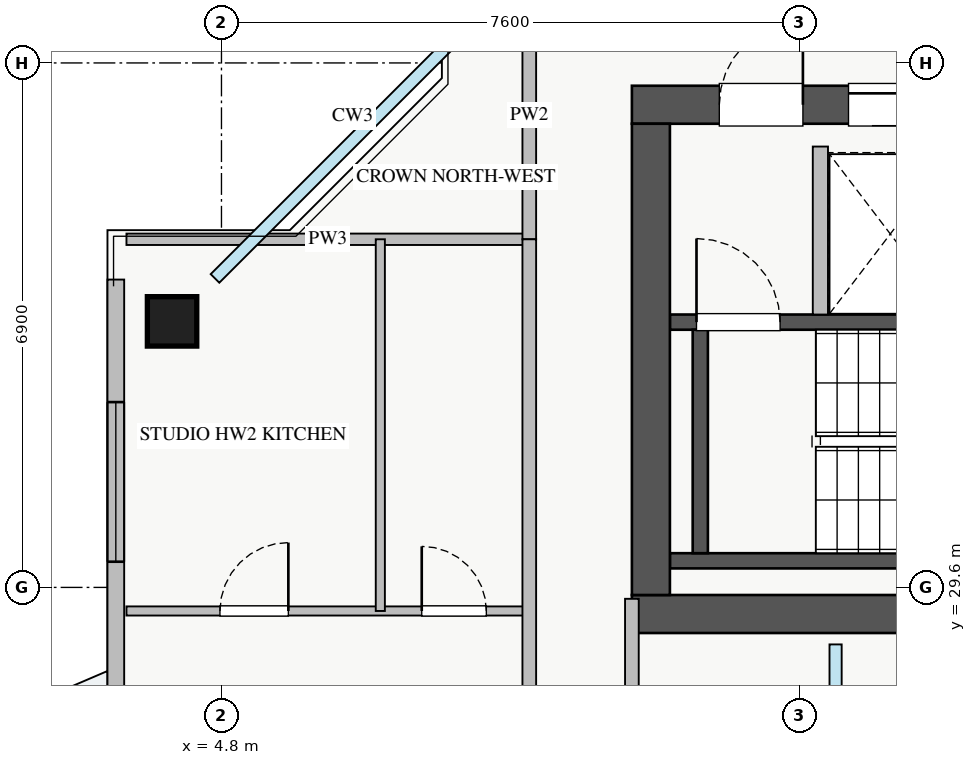
"""IFC4 building model, lengths in metres.
Left out: names, types, materials, properties, quantities, classifications, styles, units other than length and angle.
Written with IfcOpenShell. Run it as: python <this file> out.ifc"""

import sys

from ifc_helpers import new_model, si_unit, direction, frame, frame_2d, origin, origin_2d, place, context, subcontext, project, spatial, rectangle, extrude, source, transform, mapped, element, fill, save


model = new_model("IFC4")
c1 = context("Model", 3, precision=1e-05, world=origin(), true_north=direction((0.0, 1.0)))
c2 = subcontext(c1, "Body", "Model", "MODEL_VIEW")
j1 = project(units=[si_unit("LENGTHUNIT", "METRE"), si_unit("PLANEANGLEUNIT", "RADIAN")], contexts=[c1])
p1 = place(None, origin())
s1 = spatial("IfcSite", under=j1, at=p1, CompositionType="ELEMENT")
p2 = place(p1, origin())
s2 = spatial("IfcBuilding", under=s1, at=p2, CompositionType="ELEMENT")
p3 = place(p2, frame((0.0, 0.0, 250.25)))
s3 = spatial("IfcBuildingStorey", under=s2, at=p3, CompositionType="ELEMENT", Elevation=250.25)
p4 = place(p3, frame((12.68, 33.2, 0.0), z_axis=(0.0, 0.0, 1.0), x_axis=(1.0, 0.0, 0.0)))
e1 = element("IfcWall", 1, at=p4, inside=s3, PredefinedType="SHEAR", context=c2, shape_type="SweptSolid", body=[
    extrude(rectangle(XDim=1.94, YDim=0.18, at=frame_2d((0.97, 0.0))), origin(), (0.0, 0.0, 1.0), 3.07),
])
p5 = place(p3, frame((10.7, 29.95, 0.0), z_axis=(0.0, 0.0, 1.0), x_axis=(1.0, 0.0, 0.0)))
e2 = element("IfcWall", 2, at=p5, inside=s3, PredefinedType="SHEAR", context=c2, shape_type="SweptSolid", body=[
    extrude(rectangle(XDim=7.45, YDim=0.2, at=frame_2d((3.725, 0.0))), origin(), (0.0, 0.0, 1.0), 3.25),
])
p6 = place(p3, frame((10.7, 33.09, 0.0), z_axis=(0.0, 0.0, 1.0), x_axis=(1.0, 0.0, 0.0)))
e3 = element("IfcWall", 3, at=p6, inside=s3, PredefinedType="SHEAR", context=c2, shape_type="SweptSolid", body=[
    extrude(rectangle(XDim=7.45, YDim=0.2, at=frame_2d((3.725, 0.0))), origin(), (0.0, 0.0, 1.0), 3.25),
])
p7 = place(p6, frame((0.35, 0.0, 0.0)))
e4 = element("IfcOpeningElement", 4, at=p7, cuts=e3, PredefinedType="OPENING", context=c2, shape_type="SweptSolid", body=[
    extrude(rectangle(XDim=1.1, YDim=2.05, at=frame_2d((0.55, 1.025))), frame((0.0, 0.11, 0.0), z_axis=(0.0, -1.0, 0.0), x_axis=(1.0, 0.0, 0.0)), (0.0, 0.0, 1.0), 0.22),
])
p8 = place(p3, frame((11.1, 30.05, 0.0), z_axis=(0.0, 0.0, 1.0), x_axis=(0.0, 1.0, 0.0)))
e5 = element("IfcWall", 5, at=p8, inside=s3, PredefinedType="SHEAR", context=c2, shape_type="SweptSolid", body=[
    extrude(rectangle(XDim=2.94, YDim=0.2, at=frame_2d((1.47, 0.0))), origin(), (0.0, 0.0, 1.0), 3.25),
])
p9 = place(p3, frame((10.2, 29.25, 0.0), z_axis=(0.0, 0.0, 1.0), x_axis=(1.0, 0.0, 0.0)))
e6 = element("IfcWall", 6, at=p9, inside=s3, PredefinedType="SHEAR", context=c2, shape_type="SweptSolid", body=[
    extrude(rectangle(XDim=17.6, YDim=0.5, at=frame_2d((8.8, 0.0))), origin(), (0.0, 0.0, 1.0), 3.25),
])
p10 = place(p3, frame((10.2, 35.95, 0.0), z_axis=(0.0, 0.0, 1.0), x_axis=(1.0, 0.0, 0.0)))
e7 = element("IfcWall", 7, at=p10, inside=s3, PredefinedType="SHEAR", context=c2, shape_type="SweptSolid", body=[
    extrude(rectangle(XDim=17.6, YDim=0.5, at=frame_2d((8.8, 0.0))), origin(), (0.0, 0.0, 1.0), 3.25),
])
p11 = place(p10, frame((1.15, 0.0, 0.0)))
e8 = element("IfcOpeningElement", 8, at=p11, cuts=e7, PredefinedType="OPENING", context=c2, shape_type="SweptSolid", body=[
    extrude(rectangle(XDim=1.1, YDim=2.05, at=frame_2d((0.55, 1.025))), frame((0.0, 0.26, 0.0), z_axis=(0.0, -1.0, 0.0), x_axis=(1.0, 0.0, 0.0)), (0.0, 0.0, 1.0), 0.52),
])
p12 = place(p10, frame((8.3, 0.0, 0.0)))
e9 = element("IfcOpeningElement", 9, at=p12, cuts=e7, PredefinedType="OPENING", context=c2, shape_type="SweptSolid", body=[
    extrude(rectangle(XDim=1.1, YDim=2.05, at=frame_2d((0.55, 1.025))), frame((0.0, 0.26, 0.0), z_axis=(0.0, -1.0, 0.0), x_axis=(1.0, 0.0, 0.0)), (0.0, 0.0, 1.0), 0.52),
])
p13 = place(p10, frame((2.85, 0.0, 0.0)))
e10 = element("IfcOpeningElement", 10, at=p13, cuts=e7, PredefinedType="OPENING", context=c2, shape_type="SweptSolid", body=[
    extrude(rectangle(XDim=1.1, YDim=2.05, at=frame_2d((0.55, 1.025))), frame((0.0, 0.26, 0.0), z_axis=(0.0, -1.0, 0.0), x_axis=(1.0, 0.0, 0.0)), (0.0, 0.0, 1.0), 0.52),
])
p14 = place(p10, frame((5.8, 0.0, 0.0)))
e11 = element("IfcOpeningElement", 11, at=p14, cuts=e7, PredefinedType="OPENING", context=c2, shape_type="SweptSolid", body=[
    extrude(rectangle(XDim=1.0, YDim=2.05, at=frame_2d((0.5, 1.025))), frame((0.0, 0.26, 0.0), z_axis=(0.0, -1.0, 0.0), x_axis=(1.0, 0.0, 0.0)), (0.0, 0.0, 1.0), 0.52),
])
p15 = place(p10, frame((14.74, 0.0, 0.0)))
e12 = element("IfcOpeningElement", 12, at=p15, cuts=e7, PredefinedType="OPENING", context=c2, shape_type="SweptSolid", body=[
    extrude(rectangle(XDim=1.0, YDim=2.05, at=frame_2d((0.5, 1.025))), frame((0.0, 0.26, 0.0), z_axis=(0.0, -1.0, 0.0), x_axis=(1.0, 0.0, 0.0)), (0.0, 0.0, 1.0), 0.52),
])
p16 = place(p10, frame((10.25, 0.0, 0.0)))
e13 = element("IfcOpeningElement", 13, at=p16, cuts=e7, PredefinedType="OPENING", context=c2, shape_type="SweptSolid", body=[
    extrude(rectangle(XDim=1.0, YDim=2.05, at=frame_2d((0.5, 1.025))), frame((0.0, 0.26, 0.0), z_axis=(0.0, -1.0, 0.0), x_axis=(1.0, 0.0, 0.0)), (0.0, 0.0, 1.0), 0.52),
])
p17 = place(p10, frame((12.7, 0.0, 0.0)))
e14 = element("IfcOpeningElement", 14, at=p17, cuts=e7, PredefinedType="OPENING", context=c2, shape_type="SweptSolid", body=[
    extrude(rectangle(XDim=1.0, YDim=2.05, at=frame_2d((0.5, 1.025))), frame((0.0, 0.26, 0.0), z_axis=(0.0, -1.0, 0.0), x_axis=(1.0, 0.0, 0.0)), (0.0, 0.0, 1.0), 0.52),
])
p18 = place(p3, frame((10.45, 29.5, 0.0), z_axis=(0.0, 0.0, 1.0), x_axis=(0.0, 1.0, 0.0)))
e15 = element("IfcWall", 15, at=p18, inside=s3, PredefinedType="SHEAR", context=c2, shape_type="SweptSolid", body=[
    extrude(rectangle(XDim=6.2, YDim=0.5, at=frame_2d((3.1, 0.0))), origin(), (0.0, 0.0, 1.0), 3.25),
])
m1 = source(origin(), c2, "Body", "SweptSolid", [
    extrude(rectangle(XDim=0.65, YDim=0.65, at=origin_2d()), origin(), (0.0, 0.0, 1.0), 3.25),
])
p19 = place(p3, frame((4.15, 33.1, 0.0), z_axis=(0.0, 0.0, 1.0), x_axis=(1.0, 0.0, 0.0)))
e16 = element("IfcColumn", 16, at=p19, inside=s3, PredefinedType="COLUMN", context=c2, shape_type="MappedRepresentation", body=[
    mapped(m1, transform((0.0, 0.0, 0.0), x_axis=(1.0, 0.0, 0.0), y_axis=(0.0, 1.0, 0.0), z_axis=(0.0, 0.0, 1.0), scale=1.0)),
])
p20 = place(p3, frame((3.41, 12.35, 0.0), z_axis=(0.0, 0.0, 1.0), x_axis=(0.0, 1.0, 0.0)))
e17 = element("IfcWall", 17, at=p20, inside=s3, PredefinedType="STANDARD", context=c2, shape_type="SweptSolid", body=[
    extrude(rectangle(XDim=21.3, YDim=0.22, at=frame_2d((10.65, 0.0))), origin(), (0.0, 0.0, 1.0), 2.61),
])
p21 = place(p20, frame((11.5, 0.0, 0.0)))
e18 = element("IfcOpeningElement", 18, at=p21, cuts=e17, PredefinedType="OPENING", context=c2, shape_type="SweptSolid", body=[
    extrude(rectangle(XDim=1.2, YDim=2.1, at=frame_2d((0.6, 1.05))), frame((0.0, 0.12, 0.0), z_axis=(0.0, -1.0, 0.0), x_axis=(1.0, 0.0, 0.0)), (0.0, 0.0, 1.0), 0.24),
])
p22 = place(p20, frame((1.463, 0.0, 0.9)))
e19 = element("IfcOpeningElement", 19, at=p22, cuts=e17, PredefinedType="OPENING", context=c2, shape_type="SweptSolid", body=[
    extrude(rectangle(XDim=2.4, YDim=1.48, at=frame_2d((1.2, 0.74))), frame((0.0, 0.12, 0.0), z_axis=(0.0, -1.0, 0.0), x_axis=(1.0, 0.0, 0.0)), (0.0, 0.0, 1.0), 0.24),
])
p23 = place(p20, frame((17.588, 0.0, 0.9)))
e20 = element("IfcOpeningElement", 20, at=p23, cuts=e17, PredefinedType="OPENING", context=c2, shape_type="SweptSolid", body=[
    extrude(rectangle(XDim=2.1, YDim=1.48, at=frame_2d((1.05, 0.74))), frame((0.0, 0.12, 0.0), z_axis=(0.0, -1.0, 0.0), x_axis=(1.0, 0.0, 0.0)), (0.0, 0.0, 1.0), 0.24),
])
p24 = place(p20, frame((12.92, 0.0, 0.9)))
e21 = element("IfcOpeningElement", 21, at=p24, cuts=e17, PredefinedType="OPENING", context=c2, shape_type="SweptSolid", body=[
    extrude(rectangle(XDim=0.9, YDim=1.2, at=frame_2d((0.45, 0.6))), frame((0.0, 0.12, 0.0), z_axis=(0.0, -1.0, 0.0), x_axis=(1.0, 0.0, 0.0)), (0.0, 0.0, 1.0), 0.24),
])
p25 = place(p3, frame((12.68, 33.19, 0.0), z_axis=(0.0, 0.0, 1.0), x_axis=(0.0, 1.0, 0.0)))
e22 = element("IfcWall", 22, at=p25, inside=s3, PredefinedType="PARTITIONING", context=c2, shape_type="SweptSolid", body=[
    extrude(rectangle(XDim=2.21, YDim=0.2, at=frame_2d((1.105, 0.0))), origin(), (0.0, 0.0, 1.0), 3.07),
])
p26 = place(p3, frame((3.55, 34.18, 0.0), z_axis=(0.0, 0.0, 1.0), x_axis=(1.0, 0.0, 0.0)))
e23 = element("IfcWall", 23, at=p26, inside=s3, PredefinedType="PARTITIONING", context=c2, shape_type="SweptSolid", body=[
    extrude(rectangle(XDim=5.3, YDim=0.15, at=frame_2d((2.65, 0.0))), origin(), (0.0, 0.0, 1.0), 3.07),
])
p27 = place(p3, frame((8.85, 34.18, 0.0), z_axis=(0.0, 0.0, 1.0), x_axis=(0.0, 1.0, 0.0)))
e24 = element("IfcWall", 24, at=p27, inside=s3, PredefinedType="PARTITIONING", context=c2, shape_type="SweptSolid", body=[
    extrude(rectangle(XDim=3.26, YDim=0.18, at=frame_2d((1.63, 0.0))), origin(), (0.0, 0.0, 1.0), 2.569),
])
p28 = place(p3, frame((3.55, 29.29, 0.0), z_axis=(0.0, 0.0, 1.0), x_axis=(1.0, 0.0, 0.0)))
e25 = element("IfcWall", 25, at=p28, inside=s3, PredefinedType="PLUMBINGWALL", context=c2, shape_type="SweptSolid", body=[
    extrude(rectangle(XDim=5.3, YDim=0.12, at=frame_2d((2.65, 0.0))), origin(), (0.0, 0.0, 1.0), 3.07),
])
p29 = place(p28, frame((1.23, 0.0, 0.0)))
e26 = element("IfcOpeningElement", 26, at=p29, cuts=e25, PredefinedType="OPENING", context=c2, shape_type="SweptSolid", body=[
    extrude(rectangle(XDim=0.9, YDim=2.05, at=frame_2d((0.45, 1.025))), frame((0.0, 0.07, 0.0), z_axis=(0.0, -1.0, 0.0), x_axis=(1.0, 0.0, 0.0)), (0.0, 0.0, 1.0), 0.14),
])
p30 = place(p28, frame((3.885, 0.0, 0.0)))
e27 = element("IfcOpeningElement", 27, at=p30, cuts=e25, PredefinedType="OPENING", context=c2, shape_type="SweptSolid", body=[
    extrude(rectangle(XDim=0.85, YDim=2.05, at=frame_2d((0.425, 1.025))), frame((0.0, 0.07, 0.0), z_axis=(0.0, -1.0, 0.0), x_axis=(1.0, 0.0, 0.0)), (0.0, 0.0, 1.0), 0.14),
])
p31 = place(p3, frame((6.89, 29.29, 0.0), z_axis=(0.0, 0.0, 1.0), x_axis=(0.0, 1.0, 0.0)))
e28 = element("IfcWall", 28, at=p31, inside=s3, PredefinedType="PLUMBINGWALL", context=c2, shape_type="SweptSolid", body=[
    extrude(rectangle(XDim=4.89, YDim=0.12, at=frame_2d((2.445, 0.0))), origin(), (0.0, 0.0, 1.0), 3.07),
])
p32 = place(p3, frame((8.85, 11.82, 0.0), z_axis=(0.0, 0.0, 1.0), x_axis=(0.0, 1.0, 0.0)))
e29 = element("IfcWall", 29, at=p32, inside=s3, PredefinedType="PARTITIONING", context=c2, shape_type="SweptSolid", body=[
    extrude(rectangle(XDim=22.36, YDim=0.18, at=frame_2d((11.18, 0.0))), origin(), (0.0, 0.0, 1.0), 2.569),
])
p33 = place(p32, frame((2.475, 0.0, 0.0)))
e30 = element("IfcOpeningElement", 30, at=p33, cuts=e29, PredefinedType="OPENING", context=c2, shape_type="SweptSolid", body=[
    extrude(rectangle(XDim=1.0, YDim=2.05, at=frame_2d((0.5, 1.025))), frame((0.0, 0.1, 0.0), z_axis=(0.0, -1.0, 0.0), x_axis=(1.0, 0.0, 0.0)), (0.0, 0.0, 1.0), 0.2),
])
p34 = place(p32, frame((13.91, 0.0, 0.0)))
e31 = element("IfcOpeningElement", 31, at=p34, cuts=e29, PredefinedType="OPENING", context=c2, shape_type="SweptSolid", body=[
    extrude(rectangle(XDim=1.0, YDim=2.05, at=frame_2d((0.5, 1.025))), frame((0.0, 0.1, 0.0), z_axis=(0.0, -1.0, 0.0), x_axis=(1.0, 0.0, 0.0)), (0.0, 0.0, 1.0), 0.2),
])
p35 = place(p3, frame((10.2, 16.55, 0.0), z_axis=(0.0, 0.0, 1.0), x_axis=(0.0, 1.0, 0.0)))
e32 = element("IfcWall", 32, at=p35, inside=s3, PredefinedType="PARTITIONING", context=c2, shape_type="SweptSolid", body=[
    extrude(rectangle(XDim=12.9, YDim=0.18, at=frame_2d((6.45, 0.0))), origin(), (0.0, 0.0, 1.0), 3.07),
])
p36 = place(p35, frame((3.425, 0.0, 0.0)))
e33 = element("IfcOpeningElement", 33, at=p36, cuts=e32, PredefinedType="OPENING", context=c2, shape_type="SweptSolid", body=[
    extrude(rectangle(XDim=0.85, YDim=2.05, at=frame_2d((0.425, 1.025))), frame((0.0, 0.1, 0.0), z_axis=(0.0, -1.0, 0.0), x_axis=(1.0, 0.0, 0.0)), (0.0, 0.0, 1.0), 0.2),
])
p37 = place(p35, frame((9.4, 0.0, 0.0)))
e34 = element("IfcOpeningElement", 34, at=p37, cuts=e32, PredefinedType="OPENING", context=c2, shape_type="SweptSolid", body=[
    extrude(rectangle(XDim=0.9, YDim=2.05, at=frame_2d((0.45, 1.025))), frame((0.0, 0.1, 0.0), z_axis=(0.0, -1.0, 0.0), x_axis=(1.0, 0.0, 0.0)), (0.0, 0.0, 1.0), 0.2),
])
m2 = source(origin(), c2, "Body", "SweptSolid", [
    extrude(rectangle(XDim=2.1, YDim=1.48, at=frame_2d((1.05, 0.74))), frame((0.0, 0.03, 0.0), z_axis=(0.0, -1.0, 0.0), x_axis=(1.0, 0.0, 0.0)), (0.0, 0.0, 1.0), 0.06),
])
p38 = place(p23, origin())
e35 = element("IfcWindow", 35, at=p38, inside=s3, PartitioningType="TRIPLE_PANEL_VERTICAL", PredefinedType="WINDOW", context=c2, shape_type="MappedRepresentation", body=[
    mapped(m2, transform((0.0, 0.0, 0.0), x_axis=(1.0, 0.0, 0.0), y_axis=(0.0, 1.0, 0.0), z_axis=(0.0, 0.0, 1.0), scale=1.0)),
])
fill(e20, e35)
m3 = source(origin(), c2, "Body", "SweptSolid", [
    extrude(rectangle(XDim=1.1, YDim=2.05, at=frame_2d((0.55, 1.025))), frame((0.0, 0.025, 0.0), z_axis=(0.0, -1.0, 0.0), x_axis=(1.0, 0.0, 0.0)), (0.0, 0.0, 1.0), 0.05),
])
p39 = place(p11, origin())
e36 = element("IfcDoor", 36, at=p39, inside=s3, OperationType="SINGLE_SWING_RIGHT", PredefinedType="DOOR", context=c2, shape_type="MappedRepresentation", body=[
    mapped(m3, transform((0.0, 0.0, 0.0), x_axis=(1.0, 0.0, 0.0), y_axis=(0.0, 1.0, 0.0), z_axis=(0.0, 0.0, 1.0), scale=1.0)),
])
fill(e8, e36)
p40 = place(p7, origin())
e37 = element("IfcDoor", 37, at=p40, inside=s3, OperationType="SINGLE_SWING_LEFT", PredefinedType="DOOR", context=c2, shape_type="MappedRepresentation", body=[
    mapped(m3, transform((0.0, 0.0, 0.0), x_axis=(1.0, 0.0, 0.0), y_axis=(0.0, 1.0, 0.0), z_axis=(0.0, 0.0, 1.0), scale=1.0)),
])
fill(e4, e37)
p41 = place(p13, origin())
e38 = element("IfcDoor", 38, at=p41, inside=s3, OperationType="SLIDING_TO_LEFT", PredefinedType="DOOR", context=c2, shape_type="MappedRepresentation", body=[
    mapped(m3, transform((0.0, 0.0, 0.0), x_axis=(1.0, 0.0, 0.0), y_axis=(0.0, 1.0, 0.0), z_axis=(0.0, 0.0, 1.0), scale=1.0)),
])
fill(e10, e38)
m4 = source(origin(), c2, "Body", "SweptSolid", [
    extrude(rectangle(XDim=0.9, YDim=2.05, at=frame_2d((0.45, 1.025))), frame((0.0, 0.025, 0.0), z_axis=(0.0, -1.0, 0.0), x_axis=(1.0, 0.0, 0.0)), (0.0, 0.0, 1.0), 0.05),
])
p42 = place(p29, origin())
e39 = element("IfcDoor", 39, at=p42, inside=s3, OperationType="SINGLE_SWING_RIGHT", PredefinedType="DOOR", context=c2, shape_type="MappedRepresentation", body=[
    mapped(m4, transform((0.0, 0.0, 0.0), x_axis=(1.0, 0.0, 0.0), y_axis=(0.0, 1.0, 0.0), z_axis=(0.0, 0.0, 1.0), scale=1.0)),
])
fill(e26, e39)
m5 = source(origin(), c2, "Body", "SweptSolid", [
    extrude(rectangle(XDim=0.85, YDim=2.05, at=frame_2d((0.425, 1.025))), frame((0.0, 0.025, 0.0), z_axis=(0.0, -1.0, 0.0), x_axis=(1.0, 0.0, 0.0)), (0.0, 0.0, 1.0), 0.05),
])
p43 = place(p30, origin())
e40 = element("IfcDoor", 40, at=p43, inside=s3, OperationType="SINGLE_SWING_LEFT", PredefinedType="DOOR", context=c2, shape_type="MappedRepresentation", body=[
    mapped(m5, transform((0.0, 0.0, 0.0), x_axis=(1.0, 0.0, 0.0), y_axis=(0.0, 1.0, 0.0), z_axis=(0.0, 0.0, 1.0), scale=1.0)),
])
fill(e27, e40)
save(model, sys.argv[1])
